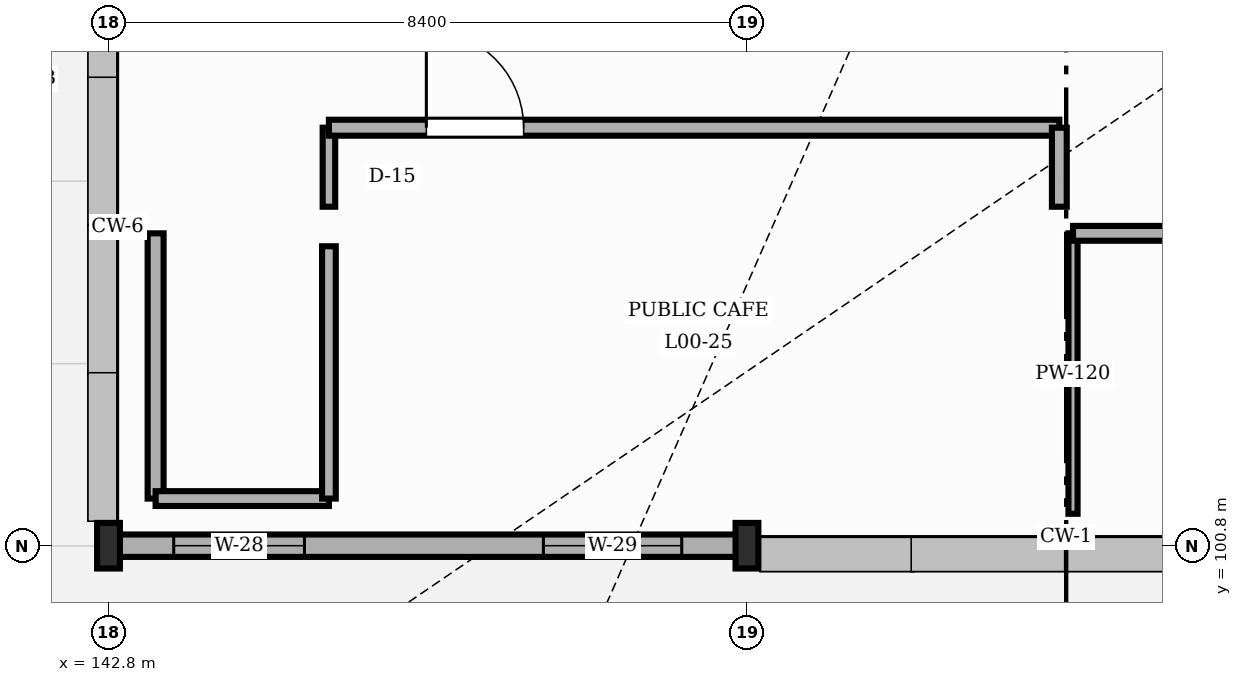
"""IFC4 building model, lengths in metres.
Left out: names, types, materials, properties, quantities, classifications, styles, units other than length and angle.
Written with IfcOpenShell. Run it as: python <this file> out.ifc"""

import sys

from ifc_helpers import new_model, si_unit, direction, frame, frame_2d, origin, origin_2d, place, context, subcontext, project, spatial, rectangle, i_section, extrude, element, fill, save


model = new_model("IFC4")
c1 = context("Model", 3, precision=1e-05, world=origin(), true_north=direction((0.0, 1.0)))
c2 = subcontext(c1, "Body", "Model", "MODEL_VIEW")
j1 = project(units=[si_unit("LENGTHUNIT", "METRE"), si_unit("PLANEANGLEUNIT", "RADIAN")], contexts=[c1])
p1 = place(None, origin())
s1 = spatial("IfcSite", under=j1, at=p1, CompositionType="ELEMENT")
p2 = place(p1, origin())
s2 = spatial("IfcBuilding", under=s1, at=p2, CompositionType="ELEMENT")
p3 = place(p2, origin())
s3 = spatial("IfcBuildingStorey", under=s2, at=p3, CompositionType="ELEMENT", Elevation=0.0)
for number, where, z_axis, x_axis in (
    (1, (142.8, 100.8, 0.0), (0.0, 0.0, 1.0), (1.0, 0.0, 0.0)),
    (2, (151.2, 100.8, 0.0), (0.0, 0.0, 1.0), (1.0, 0.0, 0.0)),
):
    element("IfcColumn", number, at=place(p3, frame(where, z_axis=z_axis, x_axis=x_axis)), inside=s3, PredefinedType="COLUMN", context=c2, shape_type="SweptSolid", body=[
        extrude(i_section(OverallWidth=0.3, OverallDepth=0.6, WebThickness=0.015, FlangeThickness=0.03, FilletRadius=0.027, at=origin_2d()), origin(), (0.0, 0.0, 1.0), 5.4),
    ])
p4 = place(p3, frame((142.808, 100.8, 0.0), z_axis=(0.0, 0.0, 1.0), x_axis=(1.0, 0.0, 0.0)))
e3 = element("IfcWall", 3, at=p4, inside=s3, PredefinedType="STANDARD", context=c2, shape_type="SweptSolid", body=[
    extrude(rectangle(XDim=8.384, YDim=0.295, at=frame_2d((4.192, 0.0))), origin(), (0.0, 0.0, 1.0), 4.827),
])
p5 = place(p4, frame((0.85, 0.0, 0.9)))
e4 = element("IfcOpeningElement", 4, at=p5, cuts=e3, PredefinedType="OPENING", context=c2, shape_type="SweptSolid", body=[
    extrude(rectangle(XDim=1.72, YDim=1.45, at=frame_2d((0.86, 0.725))), frame((0.0, 0.157, 0.0), z_axis=(0.0, -1.0, 0.0), x_axis=(1.0, 0.0, 0.0)), (0.0, 0.0, 1.0), 0.315),
])
p6 = place(p4, frame((5.714, 0.0, 0.9)))
e5 = element("IfcOpeningElement", 5, at=p6, cuts=e3, PredefinedType="OPENING", context=c2, shape_type="SweptSolid", body=[
    extrude(rectangle(XDim=1.82, YDim=1.45, at=frame_2d((0.91, 0.725))), frame((0.0, 0.157, 0.0), z_axis=(0.0, -1.0, 0.0), x_axis=(1.0, 0.0, 0.0)), (0.0, 0.0, 1.0), 0.315),
])
p7 = place(p3, frame((155.49, 101.22, -0.004), z_axis=(0.0, 0.0, 1.0), x_axis=(0.0, 1.0, 0.0)))
e6 = element("IfcWall", 6, at=p7, inside=s3, PredefinedType="STANDARD", context=c2, shape_type="SweptSolid", body=[
    extrude(rectangle(XDim=3.69, YDim=0.12, at=frame_2d((1.845, 0.0))), origin(), (0.0, 0.0, 1.0), 5.179),
])
p8 = place(p3, frame((155.49, 104.91, -0.004), z_axis=(0.0, 0.0, 1.0), x_axis=(1.0, 0.0, 0.0)))
e7 = element("IfcWall", 7, at=p8, inside=s3, PredefinedType="STANDARD", context=c2, shape_type="SweptSolid", body=[
    extrude(rectangle(XDim=4.73, YDim=0.195, at=frame_2d((2.365, 0.0))), origin(), (0.0, 0.0, 1.0), 5.179),
])
p9 = place(p3, frame((143.42, 104.91, -0.004), z_axis=(0.0, 0.0, 1.0), x_axis=(0.0, -1.0, 0.0)))
e8 = element("IfcWall", 8, at=p9, inside=s3, PredefinedType="STANDARD", context=c2, shape_type="SweptSolid", body=[
    extrude(rectangle(XDim=3.49, YDim=0.21, at=frame_2d((1.745, 0.0))), origin(), (0.0, 0.0, 1.0), 5.179),
])
p10 = place(p3, frame((143.42, 101.42, -0.004), z_axis=(0.0, 0.0, 1.0), x_axis=(1.0, 0.0, 0.0)))
e9 = element("IfcWall", 9, at=p10, inside=s3, PredefinedType="STANDARD", context=c2, shape_type="SweptSolid", body=[
    extrude(rectangle(XDim=2.28, YDim=0.195, at=frame_2d((1.14, 0.0))), origin(), (0.0, 0.0, 1.0), 5.179),
])
p11 = place(p3, frame((145.7, 101.42, -0.004), z_axis=(0.0, 0.0, 1.0), x_axis=(0.0, 1.0, 0.0)))
e10 = element("IfcWall", 10, at=p11, inside=s3, PredefinedType="STANDARD", context=c2, shape_type="SweptSolid", body=[
    extrude(rectangle(XDim=3.32, YDim=0.18, at=frame_2d((1.66, 0.0))), origin(), (0.0, 0.0, 1.0), 4.941),
])
p12 = place(p3, frame((145.7, 105.26, -0.004), z_axis=(0.0, 0.0, 1.0), x_axis=(0.0, 1.0, 0.0)))
e11 = element("IfcWall", 11, at=p12, inside=s3, PredefinedType="STANDARD", context=c2, shape_type="SweptSolid", body=[
    extrude(rectangle(XDim=1.04, YDim=0.165, at=frame_2d((0.52, 0.0))), origin(), (0.0, 0.0, 1.0), 4.941),
])
p13 = place(p3, frame((145.7, 106.3, -0.004), z_axis=(0.0, 0.0, 1.0), x_axis=(1.0, 0.0, 0.0)))
e12 = element("IfcWall", 12, at=p13, inside=s3, PredefinedType="STANDARD", context=c2, shape_type="SweptSolid", body=[
    extrude(rectangle(XDim=9.61, YDim=0.21, at=frame_2d((4.805, 0.0))), origin(), (0.0, 0.0, 1.0), 5.179),
])
p14 = place(p13, frame((1.282, 0.0, 0.0)))
e13 = element("IfcOpeningElement", 13, at=p14, cuts=e12, PredefinedType="OPENING", context=c2, shape_type="SweptSolid", body=[
    extrude(rectangle(XDim=1.28, YDim=2.14, at=frame_2d((0.64, 1.07))), frame((0.0, 0.115, 0.0), z_axis=(0.0, -1.0, 0.0), x_axis=(1.0, 0.0, 0.0)), (0.0, 0.0, 1.0), 0.23),
])
p15 = place(p3, frame((155.31, 106.3, -0.004), z_axis=(0.0, 0.0, 1.0), x_axis=(0.0, -1.0, 0.0)))
e14 = element("IfcWall", 14, at=p15, inside=s3, PredefinedType="STANDARD", context=c2, shape_type="SweptSolid", body=[
    extrude(rectangle(XDim=1.04, YDim=0.195, at=frame_2d((0.52, 0.0))), origin(), (0.0, 0.0, 1.0), 5.179),
])
p16 = place(p5, origin())
e15 = element("IfcWindow", 15, at=p16, inside=s3, PartitioningType="SINGLE_PANEL", PredefinedType="WINDOW", context=c2, shape_type="SweptSolid", body=[
    extrude(rectangle(XDim=1.72, YDim=1.45, at=frame_2d((0.86, 0.725))), frame((0.0, 0.03, 0.0), z_axis=(0.0, -1.0, 0.0), x_axis=(1.0, 0.0, 0.0)), (0.0, 0.0, 1.0), 0.06),
])
fill(e4, e15)
p17 = place(p6, origin())
e16 = element("IfcWindow", 16, at=p17, inside=s3, PartitioningType="SINGLE_PANEL", PredefinedType="WINDOW", context=c2, shape_type="SweptSolid", body=[
    extrude(rectangle(XDim=1.82, YDim=1.45, at=frame_2d((0.91, 0.725))), frame((0.0, 0.03, 0.0), z_axis=(0.0, -1.0, 0.0), x_axis=(1.0, 0.0, 0.0)), (0.0, 0.0, 1.0), 0.06),
])
fill(e5, e16)
p18 = place(p14, origin())
e17 = element("IfcDoor", 17, at=p18, inside=s3, OperationType="SINGLE_SWING_LEFT", PredefinedType="DOOR", context=c2, shape_type="SweptSolid", body=[
    extrude(rectangle(XDim=1.28, YDim=2.14, at=frame_2d((0.64, 1.07))), frame((0.0, 0.025, 0.0), z_axis=(0.0, -1.0, 0.0), x_axis=(1.0, 0.0, 0.0)), (0.0, 0.0, 1.0), 0.05),
])
fill(e13, e17)
save(model, sys.argv[1])
